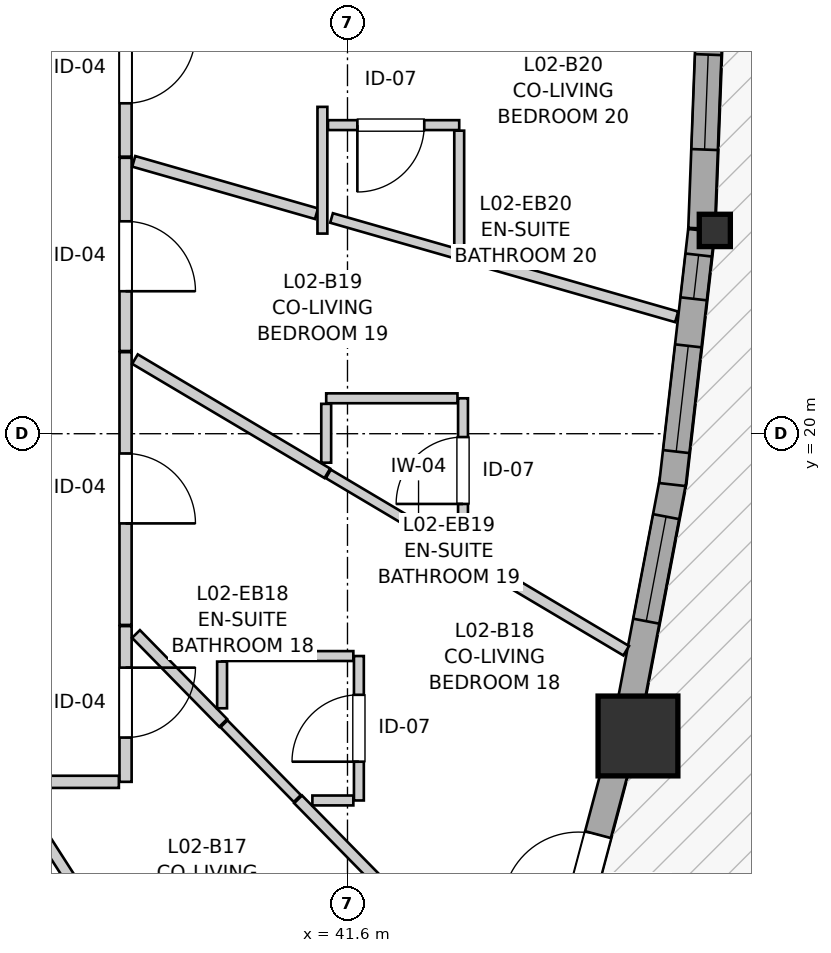
"""IFC4 building model, lengths in metres.
Left out: names, types, materials, properties, quantities, classifications, styles, units other than length and angle.
Written with IfcOpenShell. Run it as: python <this file> out.ifc"""

import sys

from ifc_helpers import new_model, si_unit, direction, frame, frame_2d, origin, origin_2d, place, context, subcontext, project, spatial, rectangle, i_section, extrude, source, transform, mapped, element, fill, save


model = new_model("IFC4")
c1 = context("Model", 3, precision=1e-05, world=origin(), true_north=direction((0.0, 1.0)))
c2 = subcontext(c1, "Body", "Model", "MODEL_VIEW")
j1 = project(units=[si_unit("LENGTHUNIT", "METRE"), si_unit("PLANEANGLEUNIT", "RADIAN")], contexts=[c1])
p1 = place(None, origin())
s1 = spatial("IfcSite", under=j1, at=p1, CompositionType="ELEMENT")
p2 = place(p1, origin())
s2 = spatial("IfcBuilding", under=s1, at=p2, CompositionType="ELEMENT")
p3 = place(p2, frame((0.0, 0.0, 11.0)))
s3 = spatial("IfcBuildingStorey", under=s2, at=p3, CompositionType="ELEMENT", Elevation=11.0)
m1 = source(origin(), c2, "Body", "SweptSolid", [
    extrude(rectangle(XDim=1.05, YDim=1.05, at=origin_2d()), origin(), (0.0, 0.0, 1.0), 2.94),
])
p4 = place(p3, frame((45.422, 16.023, 0.0), z_axis=(0.0, 0.0, 1.0), x_axis=(1.0, 0.0, 0.0)))
e1 = element("IfcColumn", 1, at=p4, inside=s3, PredefinedType="COLUMN", context=c2, shape_type="MappedRepresentation", body=[
    mapped(m1, transform((0.0, 0.0, 0.0), x_axis=(1.0, 0.0, 0.0), y_axis=(0.0, 1.0, 0.0), z_axis=(0.0, 0.0, 1.0), scale=1.0)),
])
m2 = source(origin(), c2, "Body", "SweptSolid", [
    extrude(i_section(OverallWidth=0.409, OverallDepth=0.425, WebThickness=0.03, FlangeThickness=0.048, FilletRadius=0.015, at=origin_2d()), origin(), (0.0, 0.0, 1.0), 2.94),
])
p5 = place(p3, frame((46.433, 22.675, 0.0), z_axis=(0.0, 0.0, 1.0), x_axis=(1.0, 0.0, 0.0)))
e2 = element("IfcColumn", 2, at=p5, inside=s3, PredefinedType="PILASTER", context=c2, shape_type="MappedRepresentation", body=[
    mapped(m2, transform((0.0, 0.0, 0.0), x_axis=(1.0, 0.0, 0.0), y_axis=(0.0, 1.0, 0.0), z_axis=(0.0, 0.0, 1.0), scale=1.0)),
])
p6 = place(p3, frame((44.358, 12.706, 0.0), z_axis=(0.0, 0.0, 1.0), x_axis=(0.25708907847, 0.966387709841, 0.0)))
e3 = element("IfcWall", 3, at=p6, inside=s3, PredefinedType="SOLIDWALL", context=c2, shape_type="SweptSolid", body=[
    extrude(rectangle(XDim=3.179, YDim=0.35, at=frame_2d((1.59, 0.0))), origin(), (0.0, 0.0, 1.0), 2.42),
])
p7 = place(p6, frame((1.09, 0.0, 0.0)))
e4 = element("IfcOpeningElement", 4, at=p7, cuts=e3, PredefinedType="OPENING", context=c2, shape_type="SweptSolid", body=[
    extrude(rectangle(XDim=1.0, YDim=2.1, at=frame_2d((0.5, 1.05))), frame((0.0, 0.185, 0.0), z_axis=(0.0, -1.0, 0.0), x_axis=(1.0, 0.0, 0.0)), (0.0, 0.0, 1.0), 0.37),
])
p8 = place(p3, frame((45.306, 16.351, 0.0), z_axis=(0.0, 0.0, 1.0), x_axis=(0.186681017514, 0.982420580861, 0.0)))
e5 = element("IfcWall", 5, at=p8, inside=s3, PredefinedType="SOLIDWALL", context=c2, shape_type="SweptSolid", body=[
    extrude(rectangle(XDim=3.123, YDim=0.35, at=frame_2d((1.562, 0.0))), origin(), (0.0, 0.0, 1.0), 2.42),
])
p9 = place(p8, frame((1.204, 0.0, 0.82)))
e6 = element("IfcOpeningElement", 6, at=p9, cuts=e5, PredefinedType="OPENING", context=c2, shape_type="SweptSolid", body=[
    extrude(rectangle(XDim=1.4, YDim=1.35, at=frame_2d((0.7, 0.675))), frame((0.0, 0.185, 0.0), z_axis=(0.0, -1.0, 0.0), x_axis=(1.0, 0.0, 0.0)), (0.0, 0.0, 1.0), 0.37),
])
p10 = place(p3, frame((45.875, 19.331, 0.0), z_axis=(0.0, 0.0, 1.0), x_axis=(0.113329685842, 0.99355743785, 0.0)))
e7 = element("IfcWall", 7, at=p10, inside=s3, PredefinedType="SOLIDWALL", context=c2, shape_type="SweptSolid", body=[
    extrude(rectangle(XDim=3.365, YDim=0.35, at=frame_2d((1.683, 0.0))), origin(), (0.0, 0.0, 1.0), 2.42),
])
p11 = place(p10, frame((0.437, 0.0, 0.82)))
e8 = element("IfcOpeningElement", 8, at=p11, cuts=e7, PredefinedType="OPENING", context=c2, shape_type="SweptSolid", body=[
    extrude(rectangle(XDim=1.4, YDim=1.35, at=frame_2d((0.7, 0.675))), frame((0.0, 0.185, 0.0), z_axis=(0.0, -1.0, 0.0), x_axis=(1.0, 0.0, 0.0)), (0.0, 0.0, 1.0), 0.37),
])
p12 = place(p10, frame((2.459, 0.0, 0.82)))
e9 = element("IfcOpeningElement", 9, at=p12, cuts=e7, PredefinedType="OPENING", context=c2, shape_type="SweptSolid", body=[
    extrude(rectangle(XDim=0.58, YDim=1.35, at=frame_2d((0.29, 0.675))), frame((0.0, 0.185, 0.0), z_axis=(0.0, -1.0, 0.0), x_axis=(1.0, 0.0, 0.0)), (0.0, 0.0, 1.0), 0.37),
])
p13 = place(p3, frame((46.259, 22.701, 0.0), z_axis=(0.0, 0.0, 1.0), x_axis=(0.038015581842, 0.99927714651, 0.0)))
e10 = element("IfcWall", 10, at=p13, inside=s3, PredefinedType="SOLIDWALL", context=c2, shape_type="SweptSolid", body=[
    extrude(rectangle(XDim=3.346, YDim=0.35, at=frame_2d((1.673, 0.0))), origin(), (0.0, 0.0, 1.0), 2.42),
])
p14 = place(p13, frame((1.038, 0.0, 0.82)))
e11 = element("IfcOpeningElement", 11, at=p14, cuts=e10, PredefinedType="OPENING", context=c2, shape_type="SweptSolid", body=[
    extrude(rectangle(XDim=1.25, YDim=1.35, at=frame_2d((0.625, 0.675))), frame((0.0, 0.185, 0.0), z_axis=(0.0, -1.0, 0.0), x_axis=(1.0, 0.0, 0.0)), (0.0, 0.0, 1.0), 0.37),
])
p15 = place(p3, frame((38.68, 21.073, 0.0), z_axis=(0.0, 0.0, 1.0), x_axis=(0.0, -1.0, 0.0)))
e12 = element("IfcWall", 12, at=p15, inside=s3, PredefinedType="PARTITIONING", context=c2, shape_type="SweptSolid", body=[
    extrude(rectangle(XDim=3.589, YDim=0.16, at=frame_2d((1.794, 0.0))), origin(), (0.0, 0.0, 1.0), 2.94),
])
p16 = place(p15, frame((1.333, 0.0, 0.0)))
e13 = element("IfcOpeningElement", 13, at=p16, cuts=e12, PredefinedType="OPENING", context=c2, shape_type="SweptSolid", body=[
    extrude(rectangle(XDim=0.92, YDim=2.1, at=frame_2d((0.46, 1.05))), frame((0.0, 0.09, 0.0), z_axis=(0.0, -1.0, 0.0), x_axis=(1.0, 0.0, 0.0)), (0.0, 0.0, 1.0), 0.18),
])
p17 = place(p3, frame((38.68, 23.63, 0.0), z_axis=(0.0, 0.0, 1.0), x_axis=(0.0, -1.0, 0.0)))
e14 = element("IfcWall", 14, at=p17, inside=s3, PredefinedType="PARTITIONING", context=c2, shape_type="SweptSolid", body=[
    extrude(rectangle(XDim=2.542, YDim=0.16, at=frame_2d((1.271, 0.0))), origin(), (0.0, 0.0, 1.0), 2.94),
])
p18 = place(p17, frame((0.835, 0.0, 0.0)))
e15 = element("IfcOpeningElement", 15, at=p18, cuts=e14, PredefinedType="OPENING", context=c2, shape_type="SweptSolid", body=[
    extrude(rectangle(XDim=0.92, YDim=2.1, at=frame_2d((0.46, 1.05))), frame((0.0, 0.09, 0.0), z_axis=(0.0, -1.0, 0.0), x_axis=(1.0, 0.0, 0.0)), (0.0, 0.0, 1.0), 0.18),
])
p19 = place(p3, frame((38.68, 26.015, 0.0), z_axis=(0.0, 0.0, 1.0), x_axis=(0.0, -1.0, 0.0)))
e16 = element("IfcWall", 16, at=p19, inside=s3, PredefinedType="PARTITIONING", context=c2, shape_type="SweptSolid", body=[
    extrude(rectangle(XDim=2.37, YDim=0.16, at=frame_2d((1.185, 0.0))), origin(), (0.0, 0.0, 1.0), 2.94),
])
p20 = place(p19, frame((0.748, 0.0, 0.0)))
e17 = element("IfcOpeningElement", 17, at=p20, cuts=e16, PredefinedType="OPENING", context=c2, shape_type="SweptSolid", body=[
    extrude(rectangle(XDim=0.92, YDim=2.1, at=frame_2d((0.46, 1.05))), frame((0.0, 0.09, 0.0), z_axis=(0.0, -1.0, 0.0), x_axis=(1.0, 0.0, 0.0)), (0.0, 0.0, 1.0), 0.18),
])
p21 = place(p3, frame((38.68, 17.469, 0.0), z_axis=(0.0, 0.0, 1.0), x_axis=(0.0, -1.0, 0.0)))
e18 = element("IfcWall", 18, at=p21, inside=s3, PredefinedType="PARTITIONING", context=c2, shape_type="SweptSolid", body=[
    extrude(rectangle(XDim=2.049, YDim=0.16, at=frame_2d((1.024, 0.0))), origin(), (0.0, 0.0, 1.0), 2.94),
])
p22 = place(p21, frame((0.546, 0.0, 0.0)))
e19 = element("IfcOpeningElement", 19, at=p22, cuts=e18, PredefinedType="OPENING", context=c2, shape_type="SweptSolid", body=[
    extrude(rectangle(XDim=0.92, YDim=2.1, at=frame_2d((0.46, 1.05))), frame((0.0, 0.09, 0.0), z_axis=(0.0, -1.0, 0.0), x_axis=(1.0, 0.0, 0.0)), (0.0, 0.0, 1.0), 0.18),
])
p23 = place(p3, frame((43.12, 18.566, 0.0), z_axis=(0.0, 0.0, 1.0), x_axis=(0.0, 1.0, 0.0)))
e20 = element("IfcWall", 20, at=p23, inside=s3, PredefinedType="PARTITIONING", context=c2, shape_type="SweptSolid", body=[
    extrude(rectangle(XDim=1.9, YDim=0.13, at=frame_2d((0.95, 0.0))), origin(), (0.0, 0.0, 1.0), 2.94),
])
p24 = place(p23, frame((0.51, 0.0, 0.0)))
e21 = element("IfcOpeningElement", 21, at=p24, cuts=e20, PredefinedType="OPENING", context=c2, shape_type="SweptSolid", body=[
    extrude(rectangle(XDim=0.88, YDim=2.05, at=frame_2d((0.44, 1.025))), frame((0.0, 0.075, 0.0), z_axis=(0.0, -1.0, 0.0), x_axis=(1.0, 0.0, 0.0)), (0.0, 0.0, 1.0), 0.15),
])
p25 = place(p3, frame((41.75, 15.175, 0.0), z_axis=(0.0, 0.0, 1.0), x_axis=(0.0, 1.0, 0.0)))
e22 = element("IfcWall", 22, at=p25, inside=s3, PredefinedType="PARTITIONING", context=c2, shape_type="SweptSolid", body=[
    extrude(rectangle(XDim=1.9, YDim=0.13, at=frame_2d((0.95, 0.0))), origin(), (0.0, 0.0, 1.0), 2.94),
])
p26 = place(p25, frame((0.51, 0.0, 0.0)))
e23 = element("IfcOpeningElement", 23, at=p26, cuts=e22, PredefinedType="OPENING", context=c2, shape_type="SweptSolid", body=[
    extrude(rectangle(XDim=0.88, YDim=2.05, at=frame_2d((0.44, 1.025))), frame((0.0, 0.075, 0.0), z_axis=(0.0, -1.0, 0.0), x_axis=(1.0, 0.0, 0.0)), (0.0, 0.0, 1.0), 0.15),
])
p27 = place(p3, frame((43.07, 24.06, 0.0), z_axis=(0.0, 0.0, 1.0), x_axis=(-1.0, 0.0, 0.0)))
e24 = element("IfcWall", 24, at=p27, inside=s3, PredefinedType="PARTITIONING", context=c2, shape_type="SweptSolid", body=[
    extrude(rectangle(XDim=1.727, YDim=0.13, at=frame_2d((0.864, 0.0))), origin(), (0.0, 0.0, 1.0), 2.94),
])
p28 = place(p27, frame((0.46, 0.0, 0.0)))
e25 = element("IfcOpeningElement", 25, at=p28, cuts=e24, PredefinedType="OPENING", context=c2, shape_type="SweptSolid", body=[
    extrude(rectangle(XDim=0.88, YDim=2.05, at=frame_2d((0.44, 1.025))), frame((0.0, 0.075, 0.0), z_axis=(0.0, -1.0, 0.0), x_axis=(1.0, 0.0, 0.0)), (0.0, 0.0, 1.0), 0.15),
])
p29 = place(p3, frame((40.95, 15.19, 0.0), z_axis=(0.0, 0.0, 1.0), x_axis=(0.700142401903, -0.714003233226, 0.0)))
e26 = element("IfcWall", 26, at=p29, inside=s3, PredefinedType="PARTITIONING", context=c2, shape_type="SweptSolid", body=[
    extrude(rectangle(XDim=4.298, YDim=0.145, at=frame_2d((2.149, 0.0))), origin(), (0.0, 0.0, 1.0), 2.94),
])
p30 = place(p3, frame((37.217, 15.294, 0.0), z_axis=(0.0, 0.0, 1.0), x_axis=(0.539878709929, -0.841742822105, 0.0)))
e27 = element("IfcWall", 27, at=p30, inside=s3, PredefinedType="PARTITIONING", context=c2, shape_type="SweptSolid", body=[
    extrude(rectangle(XDim=3.694, YDim=0.145, at=frame_2d((1.847, 0.0))), origin(), (0.0, 0.0, 1.0), 2.94),
])
p31 = place(p3, frame((38.804, 20.981, 0.0), z_axis=(0.0, 0.0, 1.0), x_axis=(0.859905944731, -0.510452511225, 0.0)))
e28 = element("IfcWall", 28, at=p31, inside=s3, PredefinedType="PARTITIONING", context=c2, shape_type="SweptSolid", body=[
    extrude(rectangle(XDim=2.943, YDim=0.145, at=frame_2d((1.472, 0.0))), origin(), (0.0, 0.0, 1.0), 2.94),
])
p32 = place(p3, frame((43.055, 22.361, 0.0), z_axis=(0.0, 0.0, 1.0), x_axis=(0.961351316588, -0.275324619486, 0.0)))
e29 = element("IfcWall", 29, at=p32, inside=s3, PredefinedType="PARTITIONING", context=c2, shape_type="SweptSolid", body=[
    extrude(rectangle(XDim=2.992, YDim=0.145, at=frame_2d((1.496, 0.0))), origin(), (0.0, 0.0, 1.0), 2.94),
])
p33 = place(p3, frame((42.848, 18.581, 0.0), z_axis=(0.0, 0.0, 1.0), x_axis=(0.859872599939, -0.510508679528, 0.0)))
e30 = element("IfcWall", 30, at=p33, inside=s3, PredefinedType="PARTITIONING", context=c2, shape_type="SweptSolid", body=[
    extrude(rectangle(XDim=2.813, YDim=0.145, at=frame_2d((1.407, 0.0))), origin(), (0.0, 0.0, 1.0), 2.94),
])
p34 = place(p3, frame((38.788, 23.583, 0.0), z_axis=(0.0, 0.0, 1.0), x_axis=(0.961350656565, -0.275326924078, 0.0)))
e31 = element("IfcWall", 31, at=p34, inside=s3, PredefinedType="PARTITIONING", context=c2, shape_type="SweptSolid", body=[
    extrude(rectangle(XDim=2.501, YDim=0.145, at=frame_2d((1.251, 0.0))), origin(), (0.0, 0.0, 1.0), 2.94),
])
p35 = place(p3, frame((38.817, 17.365, 0.0), z_axis=(0.0, 0.0, 1.0), x_axis=(0.70029627305, -0.713852316626, 0.0)))
e32 = element("IfcWall", 32, at=p35, inside=s3, PredefinedType="PARTITIONING", context=c2, shape_type="SweptSolid", body=[
    extrude(rectangle(XDim=1.639, YDim=0.145, at=frame_2d((0.819, 0.0))), origin(), (0.0, 0.0, 1.0), 2.94),
])
p36 = place(p3, frame((41.39, 22.838, 0.0), z_axis=(0.0, 0.0, 1.0), x_axis=(0.961362810051, -0.275284484582, 0.0)))
e33 = element("IfcWall", 33, at=p36, inside=s3, PredefinedType="PARTITIONING", context=c2, shape_type="SweptSolid", body=[
    extrude(rectangle(XDim=1.717, YDim=0.13, at=frame_2d((0.858, 0.0))), origin(), (0.0, 0.0, 1.0), 2.94),
])
for number, where, z_axis, x_axis in (
    (34, (39.95, 17.075, 0.0), (0.0, 0.0, 1.0), (1.0, 0.0, 0.0)),
    (35, (41.32, 20.466, 0.0), (0.0, 0.0, 1.0), (1.0, 0.0, 0.0)),
):
    element("IfcWall", number, at=place(p3, frame(where, z_axis=z_axis, x_axis=x_axis)), inside=s3, PredefinedType="PARTITIONING", context=c2, shape_type="SweptSolid", body=[
        extrude(rectangle(XDim=1.727, YDim=0.13, at=frame_2d((0.864, 0.0))), origin(), (0.0, 0.0, 1.0), 2.94),
    ])
p37 = place(p3, frame((41.348, 19.471, 0.0), z_axis=(0.0, 0.0, 1.0), x_axis=(0.859825694404, -0.510587676352, 0.0)))
e36 = element("IfcWall", 36, at=p37, inside=s3, PredefinedType="PARTITIONING", context=c2, shape_type="SweptSolid", body=[
    extrude(rectangle(XDim=1.729, YDim=0.13, at=frame_2d((0.865, 0.0))), origin(), (0.0, 0.0, 1.0), 2.94),
])
p38 = place(p3, frame((43.07, 22.459, 0.0), z_axis=(0.0, 0.0, 1.0), x_axis=(0.0, 1.0, 0.0)))
e37 = element("IfcWall", 37, at=p38, inside=s3, PredefinedType="PARTITIONING", context=c2, shape_type="SweptSolid", body=[
    extrude(rectangle(XDim=1.528, YDim=0.13, at=frame_2d((0.764, 0.0))), origin(), (0.0, 0.0, 1.0), 2.508),
])
p39 = place(p3, frame((37.314, 15.42, 0.0), z_axis=(0.0, 0.0, 1.0), x_axis=(1.0, 0.0, 0.0)))
e38 = element("IfcWall", 38, at=p39, inside=s3, PredefinedType="PARTITIONING", context=c2, shape_type="SweptSolid", body=[
    extrude(rectangle(XDim=1.278, YDim=0.16, at=frame_2d((0.639, 0.0))), origin(), (0.0, 0.0, 1.0), 2.94),
])
p40 = place(p3, frame((39.975, 16.184, 0.0), z_axis=(0.0, 0.0, 1.0), x_axis=(0.700338966049, -0.713810431861, 0.0)))
e39 = element("IfcWall", 39, at=p40, inside=s3, PredefinedType="PARTITIONING", context=c2, shape_type="SweptSolid", body=[
    extrude(rectangle(XDim=1.377, YDim=0.13, at=frame_2d((0.689, 0.0))), origin(), (0.0, 0.0, 1.0), 2.94),
])
p41 = place(p3, frame((41.27, 22.633, 0.0), z_axis=(0.0, 0.0, 1.0), x_axis=(0.0, 1.0, 0.0)))
e40 = element("IfcWall", 40, at=p41, inside=s3, PredefinedType="PARTITIONING", context=c2, shape_type="SweptSolid", body=[
    extrude(rectangle(XDim=1.667, YDim=0.13, at=frame_2d((0.833, 0.0))), origin(), (0.0, 0.0, 1.0), 2.94),
])
p42 = place(p3, frame((41.32, 19.619, 0.0), z_axis=(0.0, 0.0, 1.0), x_axis=(0.0, 1.0, 0.0)))
e41 = element("IfcWall", 41, at=p42, inside=s3, PredefinedType="PARTITIONING", context=c2, shape_type="SweptSolid", body=[
    extrude(rectangle(XDim=0.774, YDim=0.13, at=frame_2d((0.387, 0.0))), origin(), (0.0, 0.0, 1.0), 2.94),
])
p43 = place(p3, frame((39.95, 16.388, 0.0), z_axis=(0.0, 0.0, 1.0), x_axis=(0.0, 1.0, 0.0)))
e42 = element("IfcWall", 42, at=p43, inside=s3, PredefinedType="PARTITIONING", context=c2, shape_type="SweptSolid", body=[
    extrude(rectangle(XDim=0.614, YDim=0.13, at=frame_2d((0.307, 0.0))), origin(), (0.0, 0.0, 1.0), 2.94),
])
p44 = place(p3, frame((41.138, 15.175, 0.0), z_axis=(0.0, 0.0, 1.0), x_axis=(1.0, 0.0, 0.0)))
e43 = element("IfcWall", 43, at=p44, inside=s3, PredefinedType="PARTITIONING", context=c2, shape_type="SweptSolid", body=[
    extrude(rectangle(XDim=0.539, YDim=0.13, at=frame_2d((0.27, 0.0))), origin(), (0.0, 0.0, 1.0), 2.94),
])
m3 = source(origin(), c2, "Body", "SweptSolid", [
    extrude(rectangle(XDim=1.4, YDim=1.35, at=frame_2d((0.7, 0.675))), frame((0.0, 0.03, 0.0), z_axis=(0.0, -1.0, 0.0), x_axis=(1.0, 0.0, 0.0)), (0.0, 0.0, 1.0), 0.06),
])
p45 = place(p9, origin())
e44 = element("IfcWindow", 44, at=p45, inside=s3, PartitioningType="SINGLE_PANEL", PredefinedType="WINDOW", context=c2, shape_type="MappedRepresentation", body=[
    mapped(m3, transform((0.0, 0.0, 0.0), x_axis=(1.0, 0.0, 0.0), y_axis=(0.0, 1.0, 0.0), z_axis=(0.0, 0.0, 1.0), scale=1.0)),
])
fill(e6, e44)
p46 = place(p11, origin())
e45 = element("IfcWindow", 45, at=p46, inside=s3, PartitioningType="SINGLE_PANEL", PredefinedType="WINDOW", context=c2, shape_type="MappedRepresentation", body=[
    mapped(m3, transform((0.0, 0.0, 0.0), x_axis=(1.0, 0.0, 0.0), y_axis=(0.0, 1.0, 0.0), z_axis=(0.0, 0.0, 1.0), scale=1.0)),
])
fill(e8, e45)
m4 = source(origin(), c2, "Body", "SweptSolid", [
    extrude(rectangle(XDim=0.58, YDim=1.35, at=frame_2d((0.29, 0.675))), frame((0.0, 0.03, 0.0), z_axis=(0.0, -1.0, 0.0), x_axis=(1.0, 0.0, 0.0)), (0.0, 0.0, 1.0), 0.06),
])
p47 = place(p12, origin())
e46 = element("IfcWindow", 46, at=p47, inside=s3, PartitioningType="SINGLE_PANEL", PredefinedType="WINDOW", context=c2, shape_type="MappedRepresentation", body=[
    mapped(m4, transform((0.0, 0.0, 0.0), x_axis=(1.0, 0.0, 0.0), y_axis=(0.0, 1.0, 0.0), z_axis=(0.0, 0.0, 1.0), scale=1.0)),
])
fill(e9, e46)
m5 = source(origin(), c2, "Body", "SweptSolid", [
    extrude(rectangle(XDim=1.25, YDim=1.35, at=frame_2d((0.625, 0.675))), frame((0.0, 0.03, 0.0), z_axis=(0.0, -1.0, 0.0), x_axis=(1.0, 0.0, 0.0)), (0.0, 0.0, 1.0), 0.06),
])
p48 = place(p14, origin())
e47 = element("IfcWindow", 47, at=p48, inside=s3, PartitioningType="SINGLE_PANEL", PredefinedType="WINDOW", context=c2, shape_type="MappedRepresentation", body=[
    mapped(m5, transform((0.0, 0.0, 0.0), x_axis=(1.0, 0.0, 0.0), y_axis=(0.0, 1.0, 0.0), z_axis=(0.0, 0.0, 1.0), scale=1.0)),
])
fill(e11, e47)
m6 = source(origin(), c2, "Body", "SweptSolid", [
    extrude(rectangle(XDim=1.0, YDim=2.1, at=frame_2d((0.5, 1.05))), frame((0.0, 0.025, 0.0), z_axis=(0.0, -1.0, 0.0), x_axis=(1.0, 0.0, 0.0)), (0.0, 0.0, 1.0), 0.05),
])
p49 = place(p7, origin())
e48 = element("IfcDoor", 48, at=p49, inside=s3, OperationType="SINGLE_SWING_LEFT", PredefinedType="DOOR", context=c2, shape_type="MappedRepresentation", body=[
    mapped(m6, transform((0.0, 0.0, 0.0), x_axis=(1.0, 0.0, 0.0), y_axis=(0.0, 1.0, 0.0), z_axis=(0.0, 0.0, 1.0), scale=1.0)),
])
fill(e4, e48)
m7 = source(origin(), c2, "Body", "SweptSolid", [
    extrude(rectangle(XDim=0.92, YDim=2.1, at=frame_2d((0.46, 1.05))), frame((0.0, 0.025, 0.0), z_axis=(0.0, -1.0, 0.0), x_axis=(1.0, 0.0, 0.0)), (0.0, 0.0, 1.0), 0.05),
])
p50 = place(p16, origin())
e49 = element("IfcDoor", 49, at=p50, inside=s3, OperationType="SINGLE_SWING_RIGHT", PredefinedType="DOOR", context=c2, shape_type="MappedRepresentation", body=[
    mapped(m7, transform((0.0, 0.0, 0.0), x_axis=(1.0, 0.0, 0.0), y_axis=(0.0, 1.0, 0.0), z_axis=(0.0, 0.0, 1.0), scale=1.0)),
])
fill(e13, e49)
p51 = place(p18, origin())
e50 = element("IfcDoor", 50, at=p51, inside=s3, OperationType="SINGLE_SWING_RIGHT", PredefinedType="DOOR", context=c2, shape_type="MappedRepresentation", body=[
    mapped(m7, transform((0.0, 0.0, 0.0), x_axis=(1.0, 0.0, 0.0), y_axis=(0.0, 1.0, 0.0), z_axis=(0.0, 0.0, 1.0), scale=1.0)),
])
fill(e15, e50)
p52 = place(p20, origin())
e51 = element("IfcDoor", 51, at=p52, inside=s3, OperationType="SINGLE_SWING_LEFT", PredefinedType="DOOR", context=c2, shape_type="MappedRepresentation", body=[
    mapped(m7, transform((0.0, 0.0, 0.0), x_axis=(1.0, 0.0, 0.0), y_axis=(0.0, 1.0, 0.0), z_axis=(0.0, 0.0, 1.0), scale=1.0)),
])
fill(e17, e51)
p53 = place(p22, origin())
e52 = element("IfcDoor", 52, at=p53, inside=s3, OperationType="SINGLE_SWING_LEFT", PredefinedType="DOOR", context=c2, shape_type="MappedRepresentation", body=[
    mapped(m7, transform((0.0, 0.0, 0.0), x_axis=(1.0, 0.0, 0.0), y_axis=(0.0, 1.0, 0.0), z_axis=(0.0, 0.0, 1.0), scale=1.0)),
])
fill(e19, e52)
m8 = source(origin(), c2, "Body", "SweptSolid", [
    extrude(rectangle(XDim=0.88, YDim=2.05, at=frame_2d((0.44, 1.025))), frame((0.0, 0.025, 0.0), z_axis=(0.0, -1.0, 0.0), x_axis=(1.0, 0.0, 0.0)), (0.0, 0.0, 1.0), 0.05),
])
p54 = place(p24, origin())
e53 = element("IfcDoor", 53, at=p54, inside=s3, OperationType="SINGLE_SWING_LEFT", PredefinedType="DOOR", context=c2, shape_type="MappedRepresentation", body=[
    mapped(m8, transform((0.0, 0.0, 0.0), x_axis=(1.0, 0.0, 0.0), y_axis=(0.0, 1.0, 0.0), z_axis=(0.0, 0.0, 1.0), scale=1.0)),
])
fill(e21, e53)
p55 = place(p26, origin())
e54 = element("IfcDoor", 54, at=p55, inside=s3, OperationType="SINGLE_SWING_LEFT", PredefinedType="DOOR", context=c2, shape_type="MappedRepresentation", body=[
    mapped(m8, transform((0.0, 0.0, 0.0), x_axis=(1.0, 0.0, 0.0), y_axis=(0.0, 1.0, 0.0), z_axis=(0.0, 0.0, 1.0), scale=1.0)),
])
fill(e23, e54)
p56 = place(p28, origin())
e55 = element("IfcDoor", 55, at=p56, inside=s3, OperationType="SINGLE_SWING_RIGHT", PredefinedType="DOOR", context=c2, shape_type="MappedRepresentation", body=[
    mapped(m8, transform((0.0, 0.0, 0.0), x_axis=(1.0, 0.0, 0.0), y_axis=(0.0, 1.0, 0.0), z_axis=(0.0, 0.0, 1.0), scale=1.0)),
])
fill(e25, e55)
save(model, sys.argv[1])
